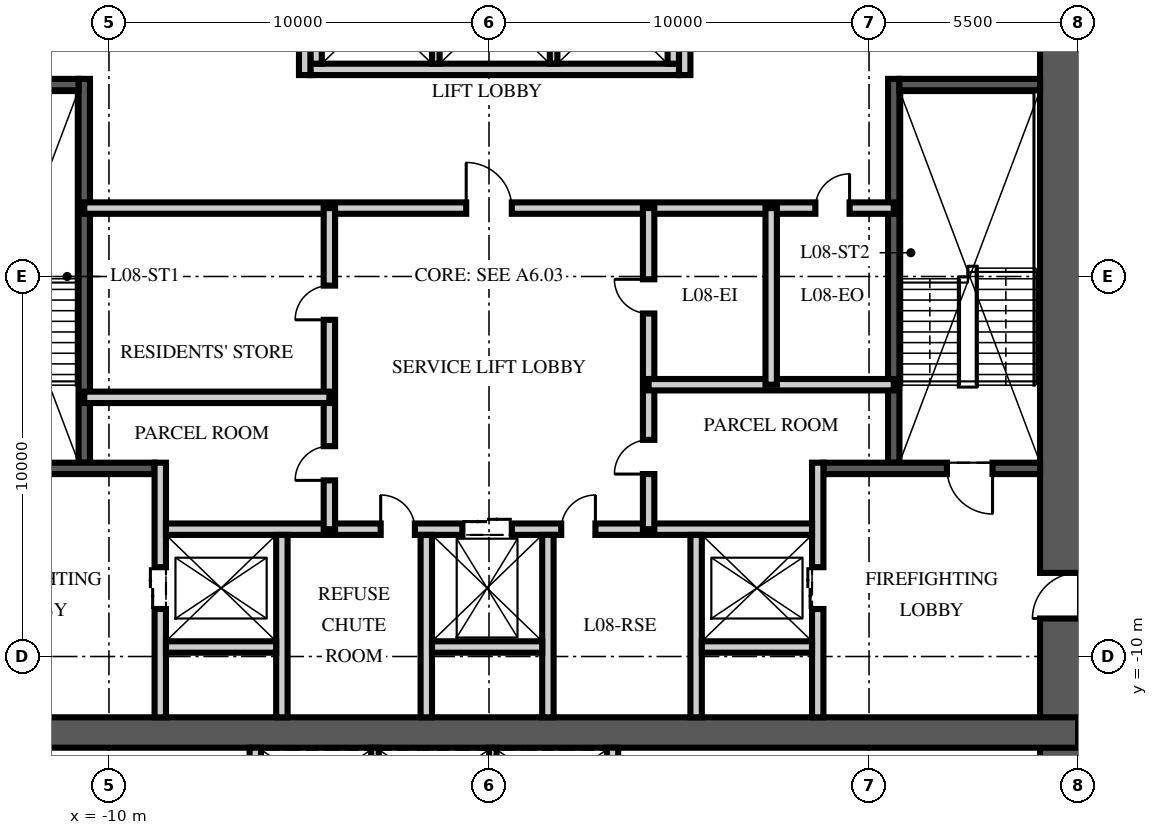
"""IFC4 building model, lengths in metres.
Left out: names, types, materials, properties, quantities, classifications, styles, units other than length and angle.
Written with IfcOpenShell. Run it as: python <this file> out.ifc"""

import sys

from ifc_helpers import new_model, si_unit, direction, frame, frame_2d, origin, place, context, subcontext, project, spatial, rectangle, extrude, element, fill, save


model = new_model("IFC4")
c1 = context("Model", 3, precision=1e-05, world=origin(), true_north=direction((0.0, 1.0)))
c2 = subcontext(c1, "Body", "Model", "MODEL_VIEW")
j1 = project(units=[si_unit("LENGTHUNIT", "METRE"), si_unit("PLANEANGLEUNIT", "RADIAN")], contexts=[c1])
p1 = place(None, origin())
s1 = spatial("IfcSite", under=j1, at=p1, CompositionType="ELEMENT")
p2 = place(p1, origin())
s2 = spatial("IfcBuilding", under=s1, at=p2, CompositionType="ELEMENT")
p3 = place(p2, frame((0.0, 0.0, 36.0)))
s3 = spatial("IfcBuildingStorey", under=s2, at=p3, CompositionType="ELEMENT", Elevation=36.0)
p4 = place(p3, frame((15.5, -15.5, -0.25), z_axis=(0.0, 0.0, 1.0), x_axis=(0.0, 1.0, 0.0)))
e1 = element("IfcWall", 1, at=p4, inside=s3, PredefinedType="SHEAR", context=c2, shape_type="SweptSolid", body=[
    extrude(rectangle(XDim=31.0, YDim=2.0, at=frame_2d((15.5, 0.0))), origin(), (0.0, 0.0, 1.0), 3.75),
])
p5 = place(p4, frame((6.5, 0.0, 0.25)))
e2 = element("IfcOpeningElement", 2, at=p5, cuts=e1, PredefinedType="OPENING", context=c2, shape_type="SweptSolid", body=[
    extrude(rectangle(XDim=1.2, YDim=2.1, at=frame_2d((0.6, 1.05))), frame((0.0, 1.01, 0.0), z_axis=(0.0, -1.0, 0.0), x_axis=(1.0, 0.0, 0.0)), (0.0, 0.0, 1.0), 2.02),
])
p6 = place(p4, frame((23.0, 0.0, 0.25)))
e3 = element("IfcOpeningElement", 3, at=p6, cuts=e1, PredefinedType="OPENING", context=c2, shape_type="SweptSolid", body=[
    extrude(rectangle(XDim=1.8, YDim=2.1, at=frame_2d((0.9, 1.05))), frame((0.0, 1.01, 0.0), z_axis=(0.0, -1.0, 0.0), x_axis=(1.0, 0.0, 0.0)), (0.0, 0.0, 1.0), 2.02),
])
p7 = place(p3, frame((-15.5, -12.0, -0.25), z_axis=(0.0, 0.0, 1.0), x_axis=(1.0, 0.0, 0.0)))
e4 = element("IfcWall", 4, at=p7, inside=s3, PredefinedType="SHEAR", context=c2, shape_type="SweptSolid", body=[
    extrude(rectangle(XDim=31.0, YDim=0.8, at=frame_2d((15.5, 0.0))), origin(), (0.0, 0.0, 1.0), 3.75),
])
p8 = place(p3, frame((-10.65, -4.9, 0.0), z_axis=(0.0, 0.0, 1.0), x_axis=(0.0, 1.0, 0.0)))
e5 = element("IfcWall", 5, at=p8, inside=s3, PredefinedType="SOLIDWALL", context=c2, shape_type="SweptSolid", body=[
    extrude(rectangle(XDim=10.1, YDim=0.3, at=frame_2d((5.05, 0.0))), origin(), (0.0, 0.0, 1.0), 3.5),
])
p9 = place(p3, frame((-14.5, -5.05, 0.0), z_axis=(0.0, 0.0, 1.0), x_axis=(1.0, 0.0, 0.0)))
e6 = element("IfcWall", 6, at=p9, inside=s3, PredefinedType="SOLIDWALL", context=c2, shape_type="SweptSolid", body=[
    extrude(rectangle(XDim=5.7, YDim=0.3, at=frame_2d((2.85, 0.0))), origin(), (0.0, 0.0, 1.0), 3.5),
])
p10 = place(p9, frame((1.25, 0.0, 0.0)))
e7 = element("IfcOpeningElement", 7, at=p10, cuts=e6, PredefinedType="OPENING", context=c2, shape_type="SweptSolid", body=[
    extrude(rectangle(XDim=1.2, YDim=2.1, at=frame_2d((0.6, 1.05))), frame((0.0, 0.16, 0.0), z_axis=(0.0, -1.0, 0.0), x_axis=(1.0, 0.0, 0.0)), (0.0, 0.0, 1.0), 0.32),
])
p11 = place(p3, frame((-14.5, 5.05, 0.0), z_axis=(0.0, 0.0, 1.0), x_axis=(1.0, 0.0, 0.0)))
e8 = element("IfcWall", 8, at=p11, inside=s3, PredefinedType="SOLIDWALL", context=c2, shape_type="SweptSolid", body=[
    extrude(rectangle(XDim=3.7, YDim=0.3, at=frame_2d((1.85, 0.0))), origin(), (0.0, 0.0, 1.0), 3.5),
])
p12 = place(p3, frame((-8.65, -11.6, 0.0), z_axis=(0.0, 0.0, 1.0), x_axis=(0.0, 1.0, 0.0)))
e9 = element("IfcWall", 9, at=p12, inside=s3, PredefinedType="PARTITIONING", context=c2, shape_type="SweptSolid", body=[
    extrude(rectangle(XDim=6.7, YDim=0.3, at=frame_2d((3.35, 0.0))), origin(), (0.0, 0.0, 1.0), 3.5),
])
p13 = place(p12, frame((2.85, 0.0, 0.0)))
e10 = element("IfcOpeningElement", 10, at=p13, cuts=e9, PredefinedType="OPENING", context=c2, shape_type="SweptSolid", body=[
    extrude(rectangle(XDim=1.1, YDim=2.1, at=frame_2d((0.55, 1.05))), frame((0.0, 0.16, 0.0), z_axis=(0.0, -1.0, 0.0), x_axis=(1.0, 0.0, 0.0)), (0.0, 0.0, 1.0), 0.32),
])
p14 = place(p3, frame((10.65, -4.9, 0.0), z_axis=(0.0, 0.0, 1.0), x_axis=(0.0, 1.0, 0.0)))
e11 = element("IfcWall", 11, at=p14, inside=s3, PredefinedType="SOLIDWALL", context=c2, shape_type="SweptSolid", body=[
    extrude(rectangle(XDim=10.1, YDim=0.3, at=frame_2d((5.05, 0.0))), origin(), (0.0, 0.0, 1.0), 3.5),
])
p15 = place(p3, frame((14.5, -5.05, 0.0), z_axis=(0.0, 0.0, 1.0), x_axis=(-1.0, 0.0, 0.0)))
e12 = element("IfcWall", 12, at=p15, inside=s3, PredefinedType="SOLIDWALL", context=c2, shape_type="SweptSolid", body=[
    extrude(rectangle(XDim=5.7, YDim=0.3, at=frame_2d((2.85, 0.0))), origin(), (0.0, 0.0, 1.0), 3.5),
])
p16 = place(p15, frame((1.25, 0.0, 0.0)))
e13 = element("IfcOpeningElement", 13, at=p16, cuts=e12, PredefinedType="OPENING", context=c2, shape_type="SweptSolid", body=[
    extrude(rectangle(XDim=1.2, YDim=2.1, at=frame_2d((0.6, 1.05))), frame((0.0, 0.16, 0.0), z_axis=(0.0, -1.0, 0.0), x_axis=(1.0, 0.0, 0.0)), (0.0, 0.0, 1.0), 0.32),
])
p17 = place(p3, frame((14.5, 5.05, 0.0), z_axis=(0.0, 0.0, 1.0), x_axis=(-1.0, 0.0, 0.0)))
e14 = element("IfcWall", 14, at=p17, inside=s3, PredefinedType="SOLIDWALL", context=c2, shape_type="SweptSolid", body=[
    extrude(rectangle(XDim=3.7, YDim=0.3, at=frame_2d((1.85, 0.0))), origin(), (0.0, 0.0, 1.0), 3.5),
])
p18 = place(p3, frame((8.65, -11.6, 0.0), z_axis=(0.0, 0.0, 1.0), x_axis=(0.0, 1.0, 0.0)))
e15 = element("IfcWall", 15, at=p18, inside=s3, PredefinedType="PARTITIONING", context=c2, shape_type="SweptSolid", body=[
    extrude(rectangle(XDim=6.7, YDim=0.3, at=frame_2d((3.35, 0.0))), origin(), (0.0, 0.0, 1.0), 3.5),
])
p19 = place(p18, frame((2.85, 0.0, 0.0)))
e16 = element("IfcOpeningElement", 16, at=p19, cuts=e15, PredefinedType="OPENING", context=c2, shape_type="SweptSolid", body=[
    extrude(rectangle(XDim=1.1, YDim=2.1, at=frame_2d((0.55, 1.05))), frame((0.0, 0.16, 0.0), z_axis=(0.0, -1.0, 0.0), x_axis=(1.0, 0.0, 0.0)), (0.0, 0.0, 1.0), 0.32),
])
p20 = place(p3, frame((-8.5, -6.65, 0.0), z_axis=(0.0, 0.0, 1.0), x_axis=(1.0, 0.0, 0.0)))
e17 = element("IfcWall", 17, at=p20, inside=s3, PredefinedType="PARTITIONING", context=c2, shape_type="SweptSolid", body=[
    extrude(rectangle(XDim=17.0, YDim=0.3, at=frame_2d((8.5, 0.0))), origin(), (0.0, 0.0, 1.0), 3.5),
])
p21 = place(p20, frame((7.8, 0.0, 0.0)))
e18 = element("IfcOpeningElement", 18, at=p21, cuts=e17, PredefinedType="OPENING", context=c2, shape_type="SweptSolid", body=[
    extrude(rectangle(XDim=1.3, YDim=2.4, at=frame_2d((0.65, 1.2))), frame((0.0, 0.16, 0.0), z_axis=(0.0, -1.0, 0.0), x_axis=(1.0, 0.0, 0.0)), (0.0, 0.0, 1.0), 0.32),
])
p22 = place(p20, frame((5.65, 0.0, 0.0)))
e19 = element("IfcOpeningElement", 19, at=p22, cuts=e17, PredefinedType="OPENING", context=c2, shape_type="SweptSolid", body=[
    extrude(rectangle(XDim=0.9, YDim=2.1, at=frame_2d((0.45, 1.05))), frame((0.0, 0.16, 0.0), z_axis=(0.0, -1.0, 0.0), x_axis=(1.0, 0.0, 0.0)), (0.0, 0.0, 1.0), 0.32),
])
p23 = place(p20, frame((10.4, 0.0, 0.0)))
e20 = element("IfcOpeningElement", 20, at=p23, cuts=e17, PredefinedType="OPENING", context=c2, shape_type="SweptSolid", body=[
    extrude(rectangle(XDim=0.9, YDim=2.1, at=frame_2d((0.45, 1.05))), frame((0.0, 0.16, 0.0), z_axis=(0.0, -1.0, 0.0), x_axis=(1.0, 0.0, 0.0)), (0.0, 0.0, 1.0), 0.32),
])
for number, where, z_axis, x_axis in (
    (21, (-5.45, -11.6, 0.0), (0.0, 0.0, 1.0), (0.0, 1.0, 0.0)),
    (22, (-1.65, -11.6, 0.0), (0.0, 0.0, 1.0), (0.0, 1.0, 0.0)),
    (23, (1.55, -11.6, 0.0), (0.0, 0.0, 1.0), (0.0, 1.0, 0.0)),
    (24, (5.45, -11.6, 0.0), (0.0, 0.0, 1.0), (0.0, 1.0, 0.0)),
):
    element("IfcWall", number, at=place(p3, frame(where, z_axis=z_axis, x_axis=x_axis)), inside=s3, PredefinedType="PARTITIONING", context=c2, shape_type="SweptSolid", body=[
        extrude(rectangle(XDim=4.8, YDim=0.3, at=frame_2d((2.4, 0.0))), origin(), (0.0, 0.0, 1.0), 3.5),
    ])
for number, where, z_axis, x_axis in (
    (25, (-8.5, -9.75, 0.0), (0.0, 0.0, 1.0), (1.0, 0.0, 0.0)),
    (26, (-1.5, -9.75, 0.0), (0.0, 0.0, 1.0), (1.0, 0.0, 0.0)),
    (27, (5.6, -9.75, 0.0), (0.0, 0.0, 1.0), (1.0, 0.0, 0.0)),
):
    element("IfcWall", number, at=place(p3, frame(where, z_axis=z_axis, x_axis=x_axis)), inside=s3, PredefinedType="PARTITIONING", context=c2, shape_type="SweptSolid", body=[
        extrude(rectangle(XDim=2.9, YDim=0.3, at=frame_2d((1.45, 0.0))), origin(), (0.0, 0.0, 1.0), 3.5),
    ])
p24 = place(p3, frame((-4.7, 5.45, 0.0), z_axis=(0.0, 0.0, 1.0), x_axis=(1.0, 0.0, 0.0)))
e28 = element("IfcWall", 28, at=p24, inside=s3, PredefinedType="PARTITIONING", context=c2, shape_type="SweptSolid", body=[
    extrude(rectangle(XDim=9.7, YDim=0.3, at=frame_2d((4.85, 0.0))), origin(), (0.0, 0.0, 1.0), 3.5),
])
for number, where, z_axis, x_axis in (
    (29, (-4.55, 5.6, 0.0), (0.0, 0.0, 1.0), (0.0, 1.0, 0.0)),
    (30, (4.85, 5.6, 0.0), (0.0, 0.0, 1.0), (0.0, 1.0, 0.0)),
):
    element("IfcWall", number, at=place(p3, frame(where, z_axis=z_axis, x_axis=x_axis)), inside=s3, PredefinedType="PARTITIONING", context=c2, shape_type="SweptSolid", body=[
        extrude(rectangle(XDim=2.8, YDim=0.3, at=frame_2d((1.4, 0.0))), origin(), (0.0, 0.0, 1.0), 3.5),
    ])
for number, where, z_axis, x_axis in (
    (31, (-1.4, 5.6, 0.0), (0.0, 0.0, 1.0), (0.0, 1.0, 0.0)),
    (32, (1.7, 5.6, 0.0), (0.0, 0.0, 1.0), (0.0, 1.0, 0.0)),
):
    element("IfcWall", number, at=place(p3, frame(where, z_axis=z_axis, x_axis=x_axis)), inside=s3, PredefinedType="PARTITIONING", context=c2, shape_type="SweptSolid", body=[
        extrude(rectangle(XDim=2.8, YDim=0.2, at=frame_2d((1.4, 0.0))), origin(), (0.0, 0.0, 1.0), 3.5),
    ])
for number, where, z_axis, x_axis in (
    (33, (-6.15, -14.5, 0.0), (0.0, 0.0, 1.0), (0.0, 1.0, 0.0)),
    (34, (3.25, -14.5, 0.0), (0.0, 0.0, 1.0), (0.0, 1.0, 0.0)),
):
    element("IfcWall", number, at=place(p3, frame(where, z_axis=z_axis, x_axis=x_axis)), inside=s3, PredefinedType="PARTITIONING", context=c2, shape_type="SweptSolid", body=[
        extrude(rectangle(XDim=2.1, YDim=0.3, at=frame_2d((1.05, 0.0))), origin(), (0.0, 0.0, 1.0), 3.5),
    ])
for number, where, z_axis, x_axis in (
    (35, (-3.0, -14.5, 0.0), (0.0, 0.0, 1.0), (0.0, 1.0, 0.0)),
    (36, (0.1, -14.5, 0.0), (0.0, 0.0, 1.0), (0.0, 1.0, 0.0)),
):
    element("IfcWall", number, at=place(p3, frame(where, z_axis=z_axis, x_axis=x_axis)), inside=s3, PredefinedType="PARTITIONING", context=c2, shape_type="SweptSolid", body=[
        extrude(rectangle(XDim=2.1, YDim=0.2, at=frame_2d((1.05, 0.0))), origin(), (0.0, 0.0, 1.0), 3.5),
    ])
p25 = place(p3, frame((-10.65, 1.8, 0.0), z_axis=(0.0, 0.0, 1.0), x_axis=(1.0, 0.0, 0.0)))
e37 = element("IfcWall", 37, at=p25, inside=s3, PredefinedType="PARTITIONING", context=c2, shape_type="SweptSolid", body=[
    extrude(rectangle(XDim=21.3, YDim=0.3, at=frame_2d((10.65, 0.0))), origin(), (0.0, 0.0, 1.0), 3.5),
])
p26 = place(p25, frame((10.05, 0.0, 0.0)))
e38 = element("IfcOpeningElement", 38, at=p26, cuts=e37, PredefinedType="OPENING", context=c2, shape_type="SweptSolid", body=[
    extrude(rectangle(XDim=1.2, YDim=2.1, at=frame_2d((0.6, 1.05))), frame((0.0, 0.16, 0.0), z_axis=(0.0, -1.0, 0.0), x_axis=(1.0, 0.0, 0.0)), (0.0, 0.0, 1.0), 0.32),
])
p27 = place(p25, frame((19.238, 0.0, 0.0)))
e39 = element("IfcOpeningElement", 39, at=p27, cuts=e37, PredefinedType="OPENING", context=c2, shape_type="SweptSolid", body=[
    extrude(rectangle(XDim=0.9, YDim=2.1, at=frame_2d((0.45, 1.05))), frame((0.0, 0.16, 0.0), z_axis=(0.0, -1.0, 0.0), x_axis=(1.0, 0.0, 0.0)), (0.0, 0.0, 1.0), 0.32),
])
p28 = place(p3, frame((-4.2, -6.65, 0.0), z_axis=(0.0, 0.0, 1.0), x_axis=(0.0, 1.0, 0.0)))
e40 = element("IfcWall", 40, at=p28, inside=s3, PredefinedType="PARTITIONING", context=c2, shape_type="SweptSolid", body=[
    extrude(rectangle(XDim=8.45, YDim=0.3, at=frame_2d((4.225, 0.0))), origin(), (0.0, 0.0, 1.0), 3.5),
])
p29 = place(p28, frame((1.285, 0.0, 0.0)))
e41 = element("IfcOpeningElement", 41, at=p29, cuts=e40, PredefinedType="OPENING", context=c2, shape_type="SweptSolid", body=[
    extrude(rectangle(XDim=0.9, YDim=2.1, at=frame_2d((0.45, 1.05))), frame((0.0, 0.16, 0.0), z_axis=(0.0, -1.0, 0.0), x_axis=(1.0, 0.0, 0.0)), (0.0, 0.0, 1.0), 0.32),
])
p30 = place(p28, frame((5.51, 0.0, 0.0)))
e42 = element("IfcOpeningElement", 42, at=p30, cuts=e40, PredefinedType="OPENING", context=c2, shape_type="SweptSolid", body=[
    extrude(rectangle(XDim=0.9, YDim=2.1, at=frame_2d((0.45, 1.05))), frame((0.0, 0.16, 0.0), z_axis=(0.0, -1.0, 0.0), x_axis=(1.0, 0.0, 0.0)), (0.0, 0.0, 1.0), 0.32),
])
p31 = place(p3, frame((4.2, -6.65, 0.0), z_axis=(0.0, 0.0, 1.0), x_axis=(0.0, 1.0, 0.0)))
e43 = element("IfcWall", 43, at=p31, inside=s3, PredefinedType="PARTITIONING", context=c2, shape_type="SweptSolid", body=[
    extrude(rectangle(XDim=8.45, YDim=0.3, at=frame_2d((4.225, 0.0))), origin(), (0.0, 0.0, 1.0), 3.5),
])
p32 = place(p31, frame((1.451, 0.0, 0.0)))
e44 = element("IfcOpeningElement", 44, at=p32, cuts=e43, PredefinedType="OPENING", context=c2, shape_type="SweptSolid", body=[
    extrude(rectangle(XDim=0.9, YDim=2.1, at=frame_2d((0.45, 1.05))), frame((0.0, 0.16, 0.0), z_axis=(0.0, -1.0, 0.0), x_axis=(1.0, 0.0, 0.0)), (0.0, 0.0, 1.0), 0.32),
])
p33 = place(p31, frame((5.676, 0.0, 0.0)))
e45 = element("IfcOpeningElement", 45, at=p33, cuts=e43, PredefinedType="OPENING", context=c2, shape_type="SweptSolid", body=[
    extrude(rectangle(XDim=0.9, YDim=2.1, at=frame_2d((0.45, 1.05))), frame((0.0, 0.16, 0.0), z_axis=(0.0, -1.0, 0.0), x_axis=(1.0, 0.0, 0.0)), (0.0, 0.0, 1.0), 0.32),
])
for number, where, z_axis, x_axis in (
    (46, (-10.65, -3.18, 0.0), (0.0, 0.0, 1.0), (1.0, 0.0, 0.0)),
    (47, (10.65, -2.848, 0.0), (0.0, 0.0, 1.0), (-1.0, 0.0, 0.0)),
):
    element("IfcWall", number, at=place(p3, frame(where, z_axis=z_axis, x_axis=x_axis)), inside=s3, PredefinedType="PARTITIONING", context=c2, shape_type="SweptSolid", body=[
        extrude(rectangle(XDim=6.45, YDim=0.3, at=frame_2d((3.225, 0.0))), origin(), (0.0, 0.0, 1.0), 3.5),
    ])
p34 = place(p3, frame((7.425, -2.848, 0.0), z_axis=(0.0, 0.0, 1.0), x_axis=(0.0, 1.0, 0.0)))
e48 = element("IfcWall", 48, at=p34, inside=s3, PredefinedType="PARTITIONING", context=c2, shape_type="SweptSolid", body=[
    extrude(rectangle(XDim=4.648, YDim=0.3, at=frame_2d((2.324, 0.0))), origin(), (0.0, 0.0, 1.0), 3.5),
])
p35 = place(p3, frame((-4.85, 5.3, 0.0), z_axis=(0.0, 0.0, 1.0), x_axis=(0.0, 1.0, 0.0)))
e49 = element("IfcWall", 49, at=p35, inside=s3, PredefinedType="PARTITIONING", context=c2, shape_type="SweptSolid", body=[
    extrude(rectangle(XDim=6.3, YDim=0.3, at=frame_2d((3.15, 0.0))), origin(), (0.0, 0.0, 1.0), 3.5),
])
p36 = place(p35, frame((4.35, 0.0, 0.0)))
e50 = element("IfcOpeningElement", 50, at=p36, cuts=e49, PredefinedType="OPENING", context=c2, shape_type="SweptSolid", body=[
    extrude(rectangle(XDim=0.9, YDim=2.1, at=frame_2d((0.45, 1.05))), frame((0.0, 0.16, 0.0), z_axis=(0.0, -1.0, 0.0), x_axis=(1.0, 0.0, 0.0)), (0.0, 0.0, 1.0), 0.32),
])
p37 = place(p3, frame((5.15, 5.3, 0.0), z_axis=(0.0, 0.0, 1.0), x_axis=(0.0, 1.0, 0.0)))
e51 = element("IfcWall", 51, at=p37, inside=s3, PredefinedType="PARTITIONING", context=c2, shape_type="SweptSolid", body=[
    extrude(rectangle(XDim=6.3, YDim=0.3, at=frame_2d((3.15, 0.0))), origin(), (0.0, 0.0, 1.0), 3.5),
])
p38 = place(p37, frame((4.35, 0.0, 0.0)))
e52 = element("IfcOpeningElement", 52, at=p38, cuts=e51, PredefinedType="OPENING", context=c2, shape_type="SweptSolid", body=[
    extrude(rectangle(XDim=0.9, YDim=2.1, at=frame_2d((0.45, 1.05))), frame((0.0, 0.16, 0.0), z_axis=(0.0, -1.0, 0.0), x_axis=(1.0, 0.0, 0.0)), (0.0, 0.0, 1.0), 0.32),
])
p39 = place(p16, origin())
e53 = element("IfcDoor", 53, at=p39, inside=s3, OperationType="SINGLE_SWING_LEFT", PredefinedType="DOOR", context=c2, shape_type="SweptSolid", body=[
    extrude(rectangle(XDim=1.2, YDim=2.1, at=frame_2d((0.6, 1.05))), frame((0.0, 0.025, 0.0), z_axis=(0.0, -1.0, 0.0), x_axis=(1.0, 0.0, 0.0)), (0.0, 0.0, 1.0), 0.05),
])
fill(e13, e53)
p40 = place(p5, origin())
e54 = element("IfcDoor", 54, at=p40, inside=s3, OperationType="SINGLE_SWING_LEFT", PredefinedType="DOOR", context=c2, shape_type="SweptSolid", body=[
    extrude(rectangle(XDim=1.2, YDim=2.1, at=frame_2d((0.6, 1.05))), frame((0.0, 0.025, 0.0), z_axis=(0.0, -1.0, 0.0), x_axis=(1.0, 0.0, 0.0)), (0.0, 0.0, 1.0), 0.05),
])
fill(e2, e54)
p41 = place(p13, origin())
e55 = element("IfcDoor", 55, at=p41, inside=s3, OperationType="DOUBLE_DOOR_SLIDING", PredefinedType="DOOR", context=c2, shape_type="SweptSolid", body=[
    extrude(rectangle(XDim=1.1, YDim=2.1, at=frame_2d((0.55, 1.05))), frame((0.0, 0.025, 0.0), z_axis=(0.0, -1.0, 0.0), x_axis=(1.0, 0.0, 0.0)), (0.0, 0.0, 1.0), 0.05),
])
fill(e10, e55)
p42 = place(p19, origin())
e56 = element("IfcDoor", 56, at=p42, inside=s3, OperationType="DOUBLE_DOOR_SLIDING", PredefinedType="DOOR", context=c2, shape_type="SweptSolid", body=[
    extrude(rectangle(XDim=1.1, YDim=2.1, at=frame_2d((0.55, 1.05))), frame((0.0, 0.025, 0.0), z_axis=(0.0, -1.0, 0.0), x_axis=(1.0, 0.0, 0.0)), (0.0, 0.0, 1.0), 0.05),
])
fill(e16, e56)
p43 = place(p21, origin())
e57 = element("IfcDoor", 57, at=p43, inside=s3, OperationType="DOUBLE_DOOR_SLIDING", PredefinedType="DOOR", context=c2, shape_type="SweptSolid", body=[
    extrude(rectangle(XDim=1.3, YDim=2.4, at=frame_2d((0.65, 1.2))), frame((0.0, 0.025, 0.0), z_axis=(0.0, -1.0, 0.0), x_axis=(1.0, 0.0, 0.0)), (0.0, 0.0, 1.0), 0.05),
])
fill(e18, e57)
p44 = place(p26, origin())
e58 = element("IfcDoor", 58, at=p44, inside=s3, OperationType="SINGLE_SWING_LEFT", PredefinedType="DOOR", context=c2, shape_type="SweptSolid", body=[
    extrude(rectangle(XDim=1.2, YDim=2.1, at=frame_2d((0.6, 1.05))), frame((0.0, 0.025, 0.0), z_axis=(0.0, -1.0, 0.0), x_axis=(1.0, 0.0, 0.0)), (0.0, 0.0, 1.0), 0.05),
])
fill(e38, e58)
p45 = place(p22, origin())
e59 = element("IfcDoor", 59, at=p45, inside=s3, OperationType="SINGLE_SWING_LEFT", PredefinedType="DOOR", context=c2, shape_type="SweptSolid", body=[
    extrude(rectangle(XDim=0.9, YDim=2.1, at=frame_2d((0.45, 1.05))), frame((0.0, 0.025, 0.0), z_axis=(0.0, -1.0, 0.0), x_axis=(1.0, 0.0, 0.0)), (0.0, 0.0, 1.0), 0.05),
])
fill(e19, e59)
p46 = place(p23, origin())
e60 = element("IfcDoor", 60, at=p46, inside=s3, OperationType="SINGLE_SWING_RIGHT", PredefinedType="DOOR", context=c2, shape_type="SweptSolid", body=[
    extrude(rectangle(XDim=0.9, YDim=2.1, at=frame_2d((0.45, 1.05))), frame((0.0, 0.025, 0.0), z_axis=(0.0, -1.0, 0.0), x_axis=(1.0, 0.0, 0.0)), (0.0, 0.0, 1.0), 0.05),
])
fill(e20, e60)
p47 = place(p29, origin())
e61 = element("IfcDoor", 61, at=p47, inside=s3, OperationType="SINGLE_SWING_LEFT", PredefinedType="DOOR", context=c2, shape_type="SweptSolid", body=[
    extrude(rectangle(XDim=0.9, YDim=2.1, at=frame_2d((0.45, 1.05))), frame((0.0, 0.025, 0.0), z_axis=(0.0, -1.0, 0.0), x_axis=(1.0, 0.0, 0.0)), (0.0, 0.0, 1.0), 0.05),
])
fill(e41, e61)
p48 = place(p30, origin())
e62 = element("IfcDoor", 62, at=p48, inside=s3, OperationType="SINGLE_SWING_LEFT", PredefinedType="DOOR", context=c2, shape_type="SweptSolid", body=[
    extrude(rectangle(XDim=0.9, YDim=2.1, at=frame_2d((0.45, 1.05))), frame((0.0, 0.025, 0.0), z_axis=(0.0, -1.0, 0.0), x_axis=(1.0, 0.0, 0.0)), (0.0, 0.0, 1.0), 0.05),
])
fill(e42, e62)
p49 = place(p32, origin())
e63 = element("IfcDoor", 63, at=p49, inside=s3, OperationType="SINGLE_SWING_LEFT", PredefinedType="DOOR", context=c2, shape_type="SweptSolid", body=[
    extrude(rectangle(XDim=0.9, YDim=2.1, at=frame_2d((0.45, 1.05))), frame((0.0, 0.025, 0.0), z_axis=(0.0, -1.0, 0.0), x_axis=(1.0, 0.0, 0.0)), (0.0, 0.0, 1.0), 0.05),
])
fill(e44, e63)
p50 = place(p33, origin())
e64 = element("IfcDoor", 64, at=p50, inside=s3, OperationType="SINGLE_SWING_RIGHT", PredefinedType="DOOR", context=c2, shape_type="SweptSolid", body=[
    extrude(rectangle(XDim=0.9, YDim=2.1, at=frame_2d((0.45, 1.05))), frame((0.0, 0.025, 0.0), z_axis=(0.0, -1.0, 0.0), x_axis=(1.0, 0.0, 0.0)), (0.0, 0.0, 1.0), 0.05),
])
fill(e45, e64)
p51 = place(p27, origin())
e65 = element("IfcDoor", 65, at=p51, inside=s3, OperationType="SINGLE_SWING_RIGHT", PredefinedType="DOOR", context=c2, shape_type="SweptSolid", body=[
    extrude(rectangle(XDim=0.9, YDim=2.1, at=frame_2d((0.45, 1.05))), frame((0.0, 0.025, 0.0), z_axis=(0.0, -1.0, 0.0), x_axis=(1.0, 0.0, 0.0)), (0.0, 0.0, 1.0), 0.05),
])
fill(e39, e65)
save(model, sys.argv[1])
